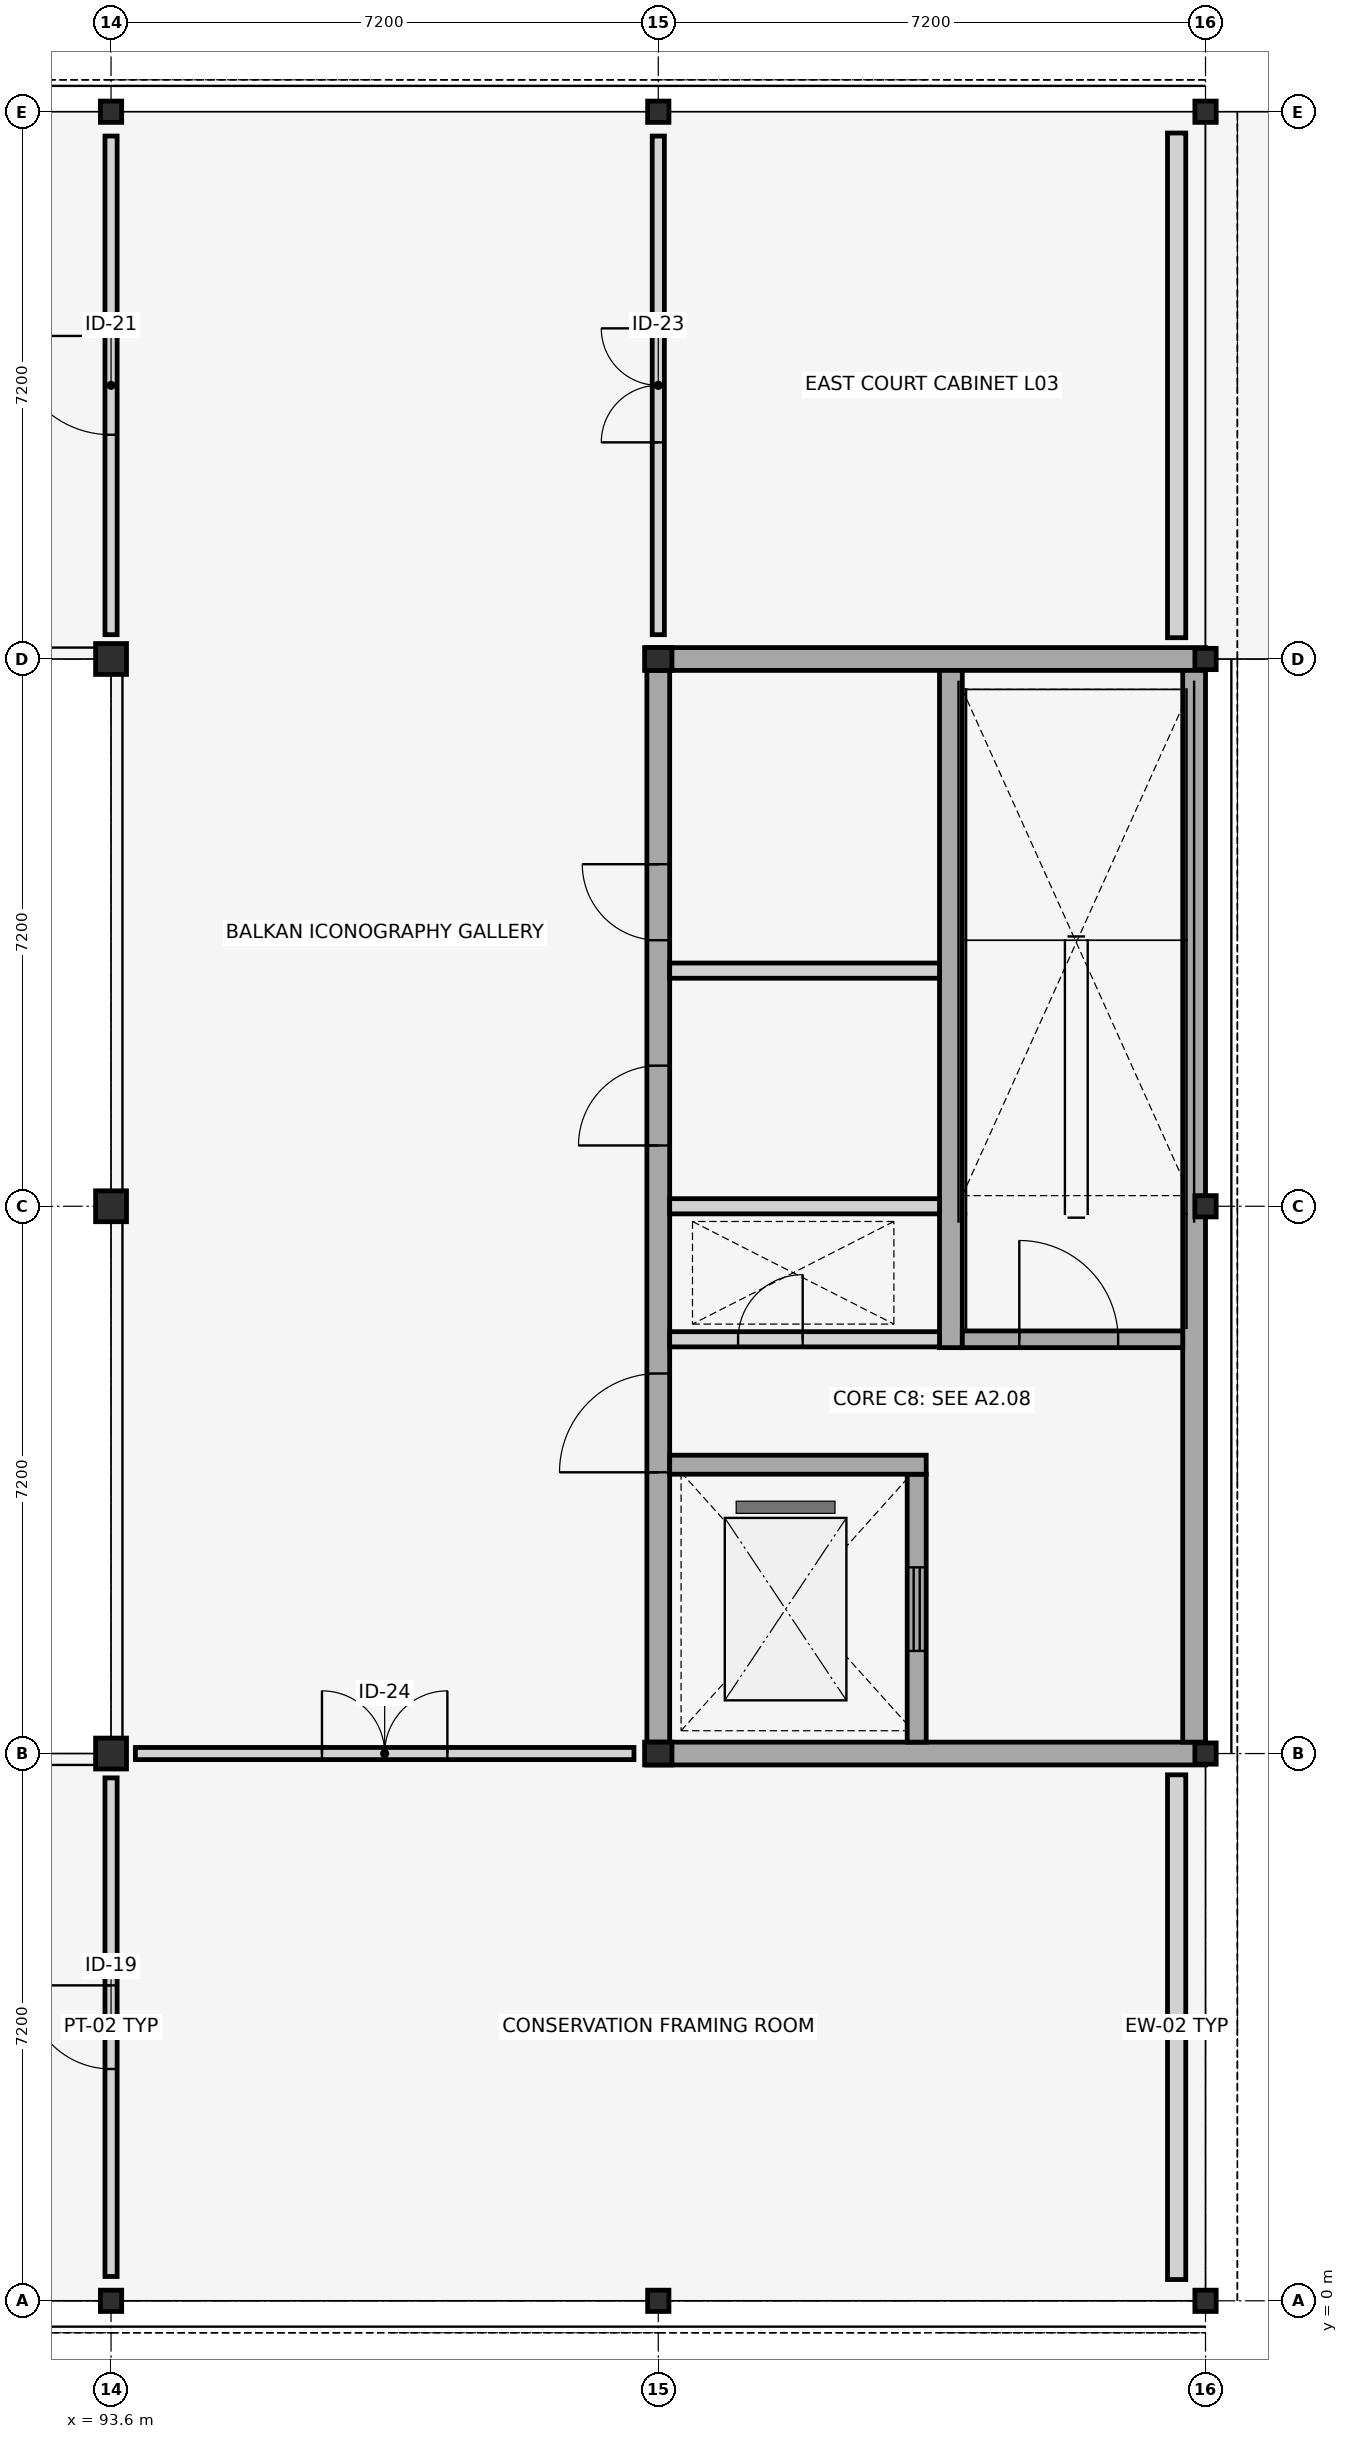
"""IFC4 building model, lengths in metres.
Left out: names, types, materials, properties, quantities, classifications, styles, units other than length and angle.
Written with IfcOpenShell. Run it as: python <this file> out.ifc"""

import sys

from ifc_helpers import new_model, si_unit, direction, frame, frame_2d, origin, origin_2d, place, context, subcontext, project, spatial, rectangle, hollow_circle, i_section, extrude, element, fill, save


model = new_model("IFC4")
c1 = context("Model", 3, precision=1e-05, world=origin(), true_north=direction((0.0, 1.0)))
c2 = subcontext(c1, "Body", "Model", "MODEL_VIEW")
j1 = project(units=[si_unit("LENGTHUNIT", "METRE"), si_unit("PLANEANGLEUNIT", "RADIAN")], contexts=[c1])
p1 = place(None, origin())
s1 = spatial("IfcSite", under=j1, at=p1, CompositionType="ELEMENT")
p2 = place(p1, origin())
s2 = spatial("IfcBuilding", under=s1, at=p2, CompositionType="ELEMENT")
p3 = place(p2, frame((0.0, 0.0, 12.9)))
s3 = spatial("IfcBuildingStorey", under=s2, at=p3, CompositionType="ELEMENT", Elevation=12.9)
p4 = place(p3, frame((93.6, 0.0, 0.0), z_axis=(0.0, 0.0, 1.0), x_axis=(0.0, 1.0, 0.0)))
e1 = element("IfcColumn", 1, at=p4, inside=s3, PredefinedType="COLUMN", context=c2, shape_type="SweptSolid", body=[
    extrude(i_section(OverallWidth=0.28, OverallDepth=0.28, WebThickness=0.01, FlangeThickness=0.018, FilletRadius=0.024, at=origin_2d()), origin(), (0.0, 0.0, 1.0), 4.2),
])
for number, where, z_axis, x_axis in (
    (2, (93.6, 7.2, 0.0), (0.0, 0.0, 1.0), (1.0, 0.0, 0.0)),
    (3, (93.6, 14.4, 0.0), (0.0, 0.0, 1.0), (0.0, 1.0, 0.0)),
    (4, (93.6, 21.6, 0.0), (0.0, 0.0, 1.0), (1.0, 0.0, 0.0)),
):
    element("IfcColumn", number, at=place(p3, frame(where, z_axis=z_axis, x_axis=x_axis)), inside=s3, PredefinedType="COLUMN", context=c2, shape_type="SweptSolid", body=[
        extrude(hollow_circle(Radius=0.203, WallThickness=0.016, at=origin_2d()), origin(), (0.0, 0.0, 1.0), 4.2),
    ])
for number, where, z_axis, x_axis in (
    (5, (93.6, 28.8, 0.0), (0.0, 0.0, 1.0), (0.0, 1.0, 0.0)),
    (6, (100.8, 0.0, 0.0), (0.0, 0.0, 1.0), (1.0, 0.0, 0.0)),
):
    element("IfcColumn", number, at=place(p3, frame(where, z_axis=z_axis, x_axis=x_axis)), inside=s3, PredefinedType="COLUMN", context=c2, shape_type="SweptSolid", body=[
        extrude(i_section(OverallWidth=0.28, OverallDepth=0.28, WebThickness=0.01, FlangeThickness=0.018, FilletRadius=0.024, at=origin_2d()), origin(), (0.0, 0.0, 1.0), 4.2),
    ])
for number, where, z_axis, x_axis in (
    (7, (100.8, 7.2, 0.0), (0.0, 0.0, 1.0), (0.0, 1.0, 0.0)),
    (8, (100.8, 21.6, 0.0), (0.0, 0.0, 1.0), (0.0, 1.0, 0.0)),
):
    element("IfcColumn", number, at=place(p3, frame(where, z_axis=z_axis, x_axis=x_axis)), inside=s3, PredefinedType="COLUMN", context=c2, shape_type="SweptSolid", body=[
        extrude(i_section(OverallWidth=0.3, OverallDepth=0.36, WebThickness=0.012, FlangeThickness=0.022, FilletRadius=0.027, at=origin_2d()), origin(), (0.0, 0.0, 1.0), 4.2),
    ])
for number, where, z_axis, x_axis in (
    (9, (100.8, 28.8, 0.0), (0.0, 0.0, 1.0), (1.0, 0.0, 0.0)),
    (10, (108.0, 0.0, 0.0), (0.0, 0.0, 1.0), (0.0, 1.0, 0.0)),
    (11, (108.0, 7.2, 0.0), (0.0, 0.0, 1.0), (1.0, 0.0, 0.0)),
    (12, (108.0, 14.4, 0.0), (0.0, 0.0, 1.0), (0.0, 1.0, 0.0)),
    (13, (108.0, 21.6, 0.0), (0.0, 0.0, 1.0), (1.0, 0.0, 0.0)),
    (14, (108.0, 28.8, 0.0), (0.0, 0.0, 1.0), (0.0, 1.0, 0.0)),
):
    element("IfcColumn", number, at=place(p3, frame(where, z_axis=z_axis, x_axis=x_axis)), inside=s3, PredefinedType="COLUMN", context=c2, shape_type="SweptSolid", body=[
        extrude(i_section(OverallWidth=0.28, OverallDepth=0.28, WebThickness=0.01, FlangeThickness=0.018, FilletRadius=0.024, at=origin_2d()), origin(), (0.0, 0.0, 1.0), 4.2),
    ])
p5 = place(p3, frame((107.62, 0.28, 0.0), z_axis=(0.0, 0.0, 1.0), x_axis=(0.0, 1.0, 0.0)))
e15 = element("IfcWall", 15, at=p5, inside=s3, PredefinedType="STANDARD", context=c2, shape_type="SweptSolid", body=[
    extrude(rectangle(XDim=6.64, YDim=0.24, at=frame_2d((3.32, 0.0))), origin(), (0.0, 0.0, 1.0), 3.56),
])
p6 = place(p3, frame((107.62, 21.88, 0.0), z_axis=(0.0, 0.0, 1.0), x_axis=(0.0, 1.0, 0.0)))
e16 = element("IfcWall", 16, at=p6, inside=s3, PredefinedType="STANDARD", context=c2, shape_type="SweptSolid", body=[
    extrude(rectangle(XDim=6.64, YDim=0.24, at=frame_2d((3.32, 0.0))), origin(), (0.0, 0.0, 1.0), 3.56),
])
for number, where, z_axis, x_axis in (
    (17, (100.65, 7.2, 0.0), (0.0, 0.0, 1.0), (1.0, 0.0, 0.0)),
    (18, (100.65, 21.6, 0.0), (0.0, 0.0, 1.0), (1.0, 0.0, 0.0)),
):
    element("IfcWall", number, at=place(p3, frame(where, z_axis=z_axis, x_axis=x_axis)), inside=s3, PredefinedType="SHEAR", context=c2, shape_type="SweptSolid", body=[
        extrude(rectangle(XDim=7.35, YDim=0.3, at=frame_2d((3.675, 0.0))), origin(), (0.0, 0.0, 1.0), 3.96),
    ])
p7 = place(p3, frame((107.85, 7.35, 0.0), z_axis=(0.0, 0.0, 1.0), x_axis=(0.0, 1.0, 0.0)))
e19 = element("IfcWall", 19, at=p7, inside=s3, PredefinedType="SHEAR", context=c2, shape_type="SweptSolid", body=[
    extrude(rectangle(XDim=14.1, YDim=0.3, at=frame_2d((7.05, 0.0))), origin(), (0.0, 0.0, 1.0), 3.96),
])
p8 = place(p3, frame((100.8, 7.35, 0.0), z_axis=(0.0, 0.0, 1.0), x_axis=(0.0, 1.0, 0.0)))
e20 = element("IfcWall", 20, at=p8, inside=s3, PredefinedType="SHEAR", context=c2, shape_type="SweptSolid", body=[
    extrude(rectangle(XDim=14.1, YDim=0.3, at=frame_2d((7.05, 0.0))), origin(), (0.0, 0.0, 1.0), 3.96),
])
p9 = place(p8, frame((3.55, 0.0, 0.0)))
e21 = element("IfcOpeningElement", 21, at=p9, cuts=e20, PredefinedType="OPENING", context=c2, shape_type="SweptSolid", body=[
    extrude(rectangle(XDim=1.3, YDim=2.2, at=frame_2d((0.65, 1.1))), frame((0.0, 0.16, 0.0), z_axis=(0.0, -1.0, 0.0), x_axis=(1.0, 0.0, 0.0)), (0.0, 0.0, 1.0), 0.32),
])
p10 = place(p8, frame((7.85, 0.0, 0.0)))
e22 = element("IfcOpeningElement", 22, at=p10, cuts=e20, PredefinedType="OPENING", context=c2, shape_type="SweptSolid", body=[
    extrude(rectangle(XDim=1.05, YDim=2.15, at=frame_2d((0.525, 1.075))), frame((0.0, 0.16, 0.0), z_axis=(0.0, -1.0, 0.0), x_axis=(1.0, 0.0, 0.0)), (0.0, 0.0, 1.0), 0.32),
])
p11 = place(p8, frame((10.55, 0.0, 0.0)))
e23 = element("IfcOpeningElement", 23, at=p11, cuts=e20, PredefinedType="OPENING", context=c2, shape_type="SweptSolid", body=[
    extrude(rectangle(XDim=1.0, YDim=2.15, at=frame_2d((0.5, 1.075))), frame((0.0, 0.16, 0.0), z_axis=(0.0, -1.0, 0.0), x_axis=(1.0, 0.0, 0.0)), (0.0, 0.0, 1.0), 0.32),
])
p12 = place(p3, frame((104.2, 7.35, 0.0), z_axis=(0.0, 0.0, 1.0), x_axis=(0.0, 1.0, 0.0)))
e24 = element("IfcWall", 24, at=p12, inside=s3, PredefinedType="SHEAR", context=c2, shape_type="SweptSolid", body=[
    extrude(rectangle(XDim=3.525, YDim=0.25, at=frame_2d((1.762, 0.0))), origin(), (0.0, 0.0, 1.0), 3.96),
])
p13 = place(p12, frame((1.2, 0.0, 0.0)))
e25 = element("IfcOpeningElement", 25, at=p13, cuts=e24, PredefinedType="OPENING", context=c2, shape_type="SweptSolid", body=[
    extrude(rectangle(XDim=1.1, YDim=2.15, at=frame_2d((0.55, 1.075))), frame((0.0, 0.135, 0.0), z_axis=(0.0, -1.0, 0.0), x_axis=(1.0, 0.0, 0.0)), (0.0, 0.0, 1.0), 0.27),
])
p14 = place(p3, frame((104.65, 12.54, 0.0), z_axis=(0.0, 0.0, 1.0), x_axis=(0.0, 1.0, 0.0)))
e26 = element("IfcWall", 26, at=p14, inside=s3, PredefinedType="SHEAR", context=c2, shape_type="SweptSolid", body=[
    extrude(rectangle(XDim=8.91, YDim=0.3, at=frame_2d((4.455, 0.0))), origin(), (0.0, 0.0, 1.0), 3.96),
])
p15 = place(p3, frame((100.95, 12.65, 0.0), z_axis=(0.0, 0.0, 1.0), x_axis=(1.0, 0.0, 0.0)))
e27 = element("IfcWall", 27, at=p15, inside=s3, PredefinedType="PLUMBINGWALL", context=c2, shape_type="SweptSolid", body=[
    extrude(rectangle(XDim=3.55, YDim=0.2, at=frame_2d((1.775, 0.0))), origin(), (0.0, 0.0, 1.0), 3.38),
])
p16 = place(p15, frame((0.9, 0.0, 0.0)))
e28 = element("IfcOpeningElement", 28, at=p16, cuts=e27, PredefinedType="OPENING", context=c2, shape_type="SweptSolid", body=[
    extrude(rectangle(XDim=0.85, YDim=2.05, at=frame_2d((0.425, 1.025))), frame((0.0, 0.11, 0.0), z_axis=(0.0, -1.0, 0.0), x_axis=(1.0, 0.0, 0.0)), (0.0, 0.0, 1.0), 0.22),
])
p17 = place(p3, frame((104.8, 12.65, 0.0), z_axis=(0.0, 0.0, 1.0), x_axis=(1.0, 0.0, 0.0)))
e29 = element("IfcWall", 29, at=p17, inside=s3, PredefinedType="SHEAR", context=c2, shape_type="SweptSolid", body=[
    extrude(rectangle(XDim=2.9, YDim=0.22, at=frame_2d((1.45, 0.0))), origin(), (0.0, 0.0, 1.0), 3.96),
])
p18 = place(p17, frame((0.75, 0.0, 0.0)))
e30 = element("IfcOpeningElement", 30, at=p18, cuts=e29, PredefinedType="OPENING", context=c2, shape_type="SweptSolid", body=[
    extrude(rectangle(XDim=1.3, YDim=2.2, at=frame_2d((0.65, 1.1))), frame((0.0, 0.12, 0.0), z_axis=(0.0, -1.0, 0.0), x_axis=(1.0, 0.0, 0.0)), (0.0, 0.0, 1.0), 0.24),
])
p19 = place(p3, frame((100.95, 11.0, 0.0), z_axis=(0.0, 0.0, 1.0), x_axis=(1.0, 0.0, 0.0)))
e31 = element("IfcWall", 31, at=p19, inside=s3, PredefinedType="SHEAR", context=c2, shape_type="SweptSolid", body=[
    extrude(rectangle(XDim=3.375, YDim=0.25, at=frame_2d((1.688, 0.0))), origin(), (0.0, 0.0, 1.0), 3.96),
])
for number, where, z_axis, x_axis in (
    (32, (100.95, 14.4, 0.0), (0.0, 0.0, 1.0), (1.0, 0.0, 0.0)),
    (33, (100.95, 17.5, 0.0), (0.0, 0.0, 1.0), (1.0, 0.0, 0.0)),
):
    element("IfcWall", number, at=place(p3, frame(where, z_axis=z_axis, x_axis=x_axis)), inside=s3, PredefinedType="PLUMBINGWALL", context=c2, shape_type="SweptSolid", body=[
        extrude(rectangle(XDim=3.55, YDim=0.2, at=frame_2d((1.775, 0.0))), origin(), (0.0, 0.0, 1.0), 3.38),
    ])
p20 = place(p3, frame((93.6, 0.32, 0.0), z_axis=(0.0, 0.0, 1.0), x_axis=(0.0, 1.0, 0.0)))
e34 = element("IfcWall", 34, at=p20, inside=s3, PredefinedType="PARTITIONING", context=c2, shape_type="SweptSolid", body=[
    extrude(rectangle(XDim=6.56, YDim=0.16, at=frame_2d((3.28, 0.0))), origin(), (0.0, 0.0, 1.0), 3.15),
])
p21 = place(p20, frame((2.73, 0.0, 0.0)))
e35 = element("IfcOpeningElement", 35, at=p21, cuts=e34, PredefinedType="OPENING", context=c2, shape_type="SweptSolid", body=[
    extrude(rectangle(XDim=1.1, YDim=2.35, at=frame_2d((0.55, 1.175))), frame((0.0, 0.09, 0.0), z_axis=(0.0, -1.0, 0.0), x_axis=(1.0, 0.0, 0.0)), (0.0, 0.0, 1.0), 0.18),
])
p22 = place(p3, frame((93.6, 21.92, 0.0), z_axis=(0.0, 0.0, 1.0), x_axis=(0.0, 1.0, 0.0)))
e36 = element("IfcWall", 36, at=p22, inside=s3, PredefinedType="PARTITIONING", context=c2, shape_type="SweptSolid", body=[
    extrude(rectangle(XDim=6.56, YDim=0.16, at=frame_2d((3.28, 0.0))), origin(), (0.0, 0.0, 1.0), 3.15),
])
p23 = place(p22, frame((2.63, 0.0, 0.0)))
e37 = element("IfcOpeningElement", 37, at=p23, cuts=e36, PredefinedType="OPENING", context=c2, shape_type="SweptSolid", body=[
    extrude(rectangle(XDim=1.3, YDim=2.45, at=frame_2d((0.65, 1.225))), frame((0.0, 0.09, 0.0), z_axis=(0.0, -1.0, 0.0), x_axis=(1.0, 0.0, 0.0)), (0.0, 0.0, 1.0), 0.18),
])
p24 = place(p3, frame((100.8, 21.92, 0.0), z_axis=(0.0, 0.0, 1.0), x_axis=(0.0, 1.0, 0.0)))
e38 = element("IfcWall", 38, at=p24, inside=s3, PredefinedType="PARTITIONING", context=c2, shape_type="SweptSolid", body=[
    extrude(rectangle(XDim=6.56, YDim=0.16, at=frame_2d((3.28, 0.0))), origin(), (0.0, 0.0, 1.0), 3.15),
])
p25 = place(p24, frame((2.53, 0.0, 0.0)))
e39 = element("IfcOpeningElement", 39, at=p25, cuts=e38, PredefinedType="OPENING", context=c2, shape_type="SweptSolid", body=[
    extrude(rectangle(XDim=1.5, YDim=2.5, at=frame_2d((0.75, 1.25))), frame((0.0, 0.09, 0.0), z_axis=(0.0, -1.0, 0.0), x_axis=(1.0, 0.0, 0.0)), (0.0, 0.0, 1.0), 0.18),
])
p26 = place(p3, frame((93.92, 7.2, 0.0), z_axis=(0.0, 0.0, 1.0), x_axis=(1.0, 0.0, 0.0)))
e40 = element("IfcWall", 40, at=p26, inside=s3, PredefinedType="PARTITIONING", context=c2, shape_type="SweptSolid", body=[
    extrude(rectangle(XDim=6.56, YDim=0.16, at=frame_2d((3.28, 0.0))), origin(), (0.0, 0.0, 1.0), 3.15),
])
p27 = place(p26, frame((2.455, 0.0, 0.0)))
e41 = element("IfcOpeningElement", 41, at=p27, cuts=e40, PredefinedType="OPENING", context=c2, shape_type="SweptSolid", body=[
    extrude(rectangle(XDim=1.65, YDim=2.45, at=frame_2d((0.825, 1.225))), frame((0.0, 0.09, 0.0), z_axis=(0.0, -1.0, 0.0), x_axis=(1.0, 0.0, 0.0)), (0.0, 0.0, 1.0), 0.18),
])
p28 = place(p9, origin())
e42 = element("IfcDoor", 42, at=p28, inside=s3, OperationType="SINGLE_SWING_LEFT", PredefinedType="DOOR", context=c2, shape_type="SweptSolid", body=[
    extrude(rectangle(XDim=1.3, YDim=2.2, at=frame_2d((0.65, 1.1))), frame((0.0, 0.025, 0.0), z_axis=(0.0, -1.0, 0.0), x_axis=(1.0, 0.0, 0.0)), (0.0, 0.0, 1.0), 0.05),
])
fill(e21, e42)
p29 = place(p10, origin())
e43 = element("IfcDoor", 43, at=p29, inside=s3, OperationType="SINGLE_SWING_LEFT", PredefinedType="DOOR", context=c2, shape_type="SweptSolid", body=[
    extrude(rectangle(XDim=1.05, YDim=2.15, at=frame_2d((0.525, 1.075))), frame((0.0, 0.025, 0.0), z_axis=(0.0, -1.0, 0.0), x_axis=(1.0, 0.0, 0.0)), (0.0, 0.0, 1.0), 0.05),
])
fill(e22, e43)
p30 = place(p11, origin())
e44 = element("IfcDoor", 44, at=p30, inside=s3, OperationType="SINGLE_SWING_RIGHT", PredefinedType="DOOR", context=c2, shape_type="SweptSolid", body=[
    extrude(rectangle(XDim=1.0, YDim=2.15, at=frame_2d((0.5, 1.075))), frame((0.0, 0.025, 0.0), z_axis=(0.0, -1.0, 0.0), x_axis=(1.0, 0.0, 0.0)), (0.0, 0.0, 1.0), 0.05),
])
fill(e23, e44)
p31 = place(p13, origin())
e45 = element("IfcDoor", 45, at=p31, inside=s3, OperationType="SLIDING_TO_LEFT", PredefinedType="DOOR", context=c2, shape_type="SweptSolid", body=[
    extrude(rectangle(XDim=1.1, YDim=2.15, at=frame_2d((0.55, 1.075))), frame((0.0, 0.025, 0.0), z_axis=(0.0, -1.0, 0.0), x_axis=(1.0, 0.0, 0.0)), (0.0, 0.0, 1.0), 0.05),
])
fill(e25, e45)
p32 = place(p16, origin())
e46 = element("IfcDoor", 46, at=p32, inside=s3, OperationType="SINGLE_SWING_RIGHT", PredefinedType="TRAPDOOR", context=c2, shape_type="SweptSolid", body=[
    extrude(rectangle(XDim=0.85, YDim=2.05, at=frame_2d((0.425, 1.025))), frame((0.0, 0.025, 0.0), z_axis=(0.0, -1.0, 0.0), x_axis=(1.0, 0.0, 0.0)), (0.0, 0.0, 1.0), 0.05),
])
fill(e28, e46)
p33 = place(p18, origin())
e47 = element("IfcDoor", 47, at=p33, inside=s3, OperationType="SINGLE_SWING_LEFT", PredefinedType="DOOR", context=c2, shape_type="SweptSolid", body=[
    extrude(rectangle(XDim=1.3, YDim=2.2, at=frame_2d((0.65, 1.1))), frame((0.0, 0.025, 0.0), z_axis=(0.0, -1.0, 0.0), x_axis=(1.0, 0.0, 0.0)), (0.0, 0.0, 1.0), 0.05),
])
fill(e30, e47)
p34 = place(p21, origin())
e48 = element("IfcDoor", 48, at=p34, inside=s3, OperationType="SINGLE_SWING_RIGHT", PredefinedType="DOOR", context=c2, shape_type="SweptSolid", body=[
    extrude(rectangle(XDim=1.1, YDim=2.35, at=frame_2d((0.55, 1.175))), frame((0.0, 0.025, 0.0), z_axis=(0.0, -1.0, 0.0), x_axis=(1.0, 0.0, 0.0)), (0.0, 0.0, 1.0), 0.05),
])
fill(e35, e48)
p35 = place(p23, origin())
e49 = element("IfcDoor", 49, at=p35, inside=s3, OperationType="SINGLE_SWING_RIGHT", PredefinedType="DOOR", context=c2, shape_type="SweptSolid", body=[
    extrude(rectangle(XDim=1.3, YDim=2.45, at=frame_2d((0.65, 1.225))), frame((0.0, 0.025, 0.0), z_axis=(0.0, -1.0, 0.0), x_axis=(1.0, 0.0, 0.0)), (0.0, 0.0, 1.0), 0.05),
])
fill(e37, e49)
p36 = place(p25, origin())
e50 = element("IfcDoor", 50, at=p36, inside=s3, OperationType="DOUBLE_DOOR_SINGLE_SWING", PredefinedType="DOOR", context=c2, shape_type="SweptSolid", body=[
    extrude(rectangle(XDim=1.5, YDim=2.5, at=frame_2d((0.75, 1.25))), frame((0.0, 0.025, 0.0), z_axis=(0.0, -1.0, 0.0), x_axis=(1.0, 0.0, 0.0)), (0.0, 0.0, 1.0), 0.05),
])
fill(e39, e50)
p37 = place(p27, origin())
e51 = element("IfcDoor", 51, at=p37, inside=s3, OperationType="DOUBLE_DOOR_SINGLE_SWING", PredefinedType="DOOR", context=c2, shape_type="SweptSolid", body=[
    extrude(rectangle(XDim=1.65, YDim=2.45, at=frame_2d((0.825, 1.225))), frame((0.0, 0.025, 0.0), z_axis=(0.0, -1.0, 0.0), x_axis=(1.0, 0.0, 0.0)), (0.0, 0.0, 1.0), 0.05),
])
fill(e41, e51)
save(model, sys.argv[1])
